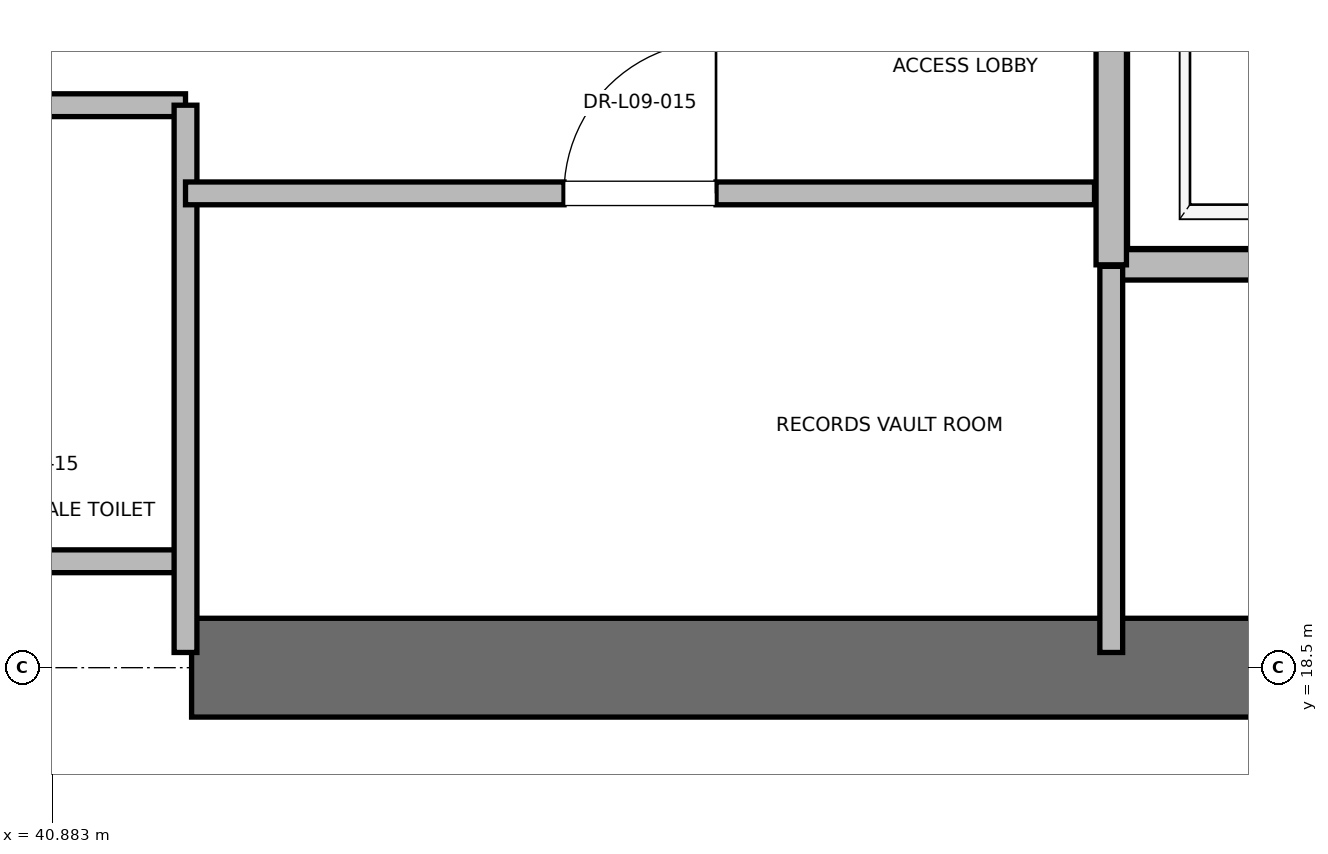
"""IFC4 building model, lengths in metres.
Left out: names, types, materials, properties, quantities, classifications, styles, units other than length and angle.
Written with IfcOpenShell. Run it as: python <this file> out.ifc"""

import sys

from ifc_helpers import new_model, si_unit, direction, frame, frame_2d, origin, place, context, subcontext, project, spatial, rectangle, extrude, element, fill, save


model = new_model("IFC4")
c1 = context("Model", 3, precision=1e-05, world=origin(), true_north=direction((0.0, 1.0)))
c2 = subcontext(c1, "Body", "Model", "MODEL_VIEW")
j1 = project(units=[si_unit("LENGTHUNIT", "METRE"), si_unit("PLANEANGLEUNIT", "RADIAN")], contexts=[c1])
p1 = place(None, origin())
s1 = spatial("IfcSite", under=j1, at=p1, CompositionType="ELEMENT")
p2 = place(p1, origin())
s2 = spatial("IfcBuilding", under=s1, at=p2, CompositionType="ELEMENT")
p3 = place(p2, frame((0.0, 0.0, 43.6)))
s3 = spatial("IfcBuildingStorey", under=s2, at=p3, CompositionType="ELEMENT", Elevation=43.6)
p4 = place(p3, frame((41.8, 18.5, 0.0), z_axis=(0.0, 0.0, 1.0), x_axis=(1.0, 0.0, 0.0)))
e1 = element("IfcWall", 1, at=p4, inside=s3, PredefinedType="SHEAR", context=c2, shape_type="SweptSolid", body=[
    extrude(rectangle(XDim=9.2, YDim=0.65, at=frame_2d((4.6, 0.0))), origin(), (0.0, 0.0, 1.0), 3.76),
])
p5 = place(p3, frame((47.85, 21.15, 0.0), z_axis=(0.0, 0.0, 1.0), x_axis=(1.0, 0.0, 0.0)))
e2 = element("IfcWall", 2, at=p5, inside=s3, PredefinedType="SOLIDWALL", context=c2, shape_type="SweptSolid", body=[
    extrude(rectangle(XDim=2.6, YDim=0.2, at=frame_2d((1.3, 0.0))), origin(), (0.0, 0.0, 1.0), 3.76),
])
p6 = place(p3, frame((47.85, 24.15, 0.0), z_axis=(0.0, 0.0, 1.0), x_axis=(0.0, -1.0, 0.0)))
e3 = element("IfcWall", 3, at=p6, inside=s3, PredefinedType="SOLIDWALL", context=c2, shape_type="SweptSolid", body=[
    extrude(rectangle(XDim=3.0, YDim=0.2, at=frame_2d((1.5, 0.0))), origin(), (0.0, 0.0, 1.0), 3.76),
])
for number, where, z_axis, x_axis in (
    (4, (39.95, 19.2, 0.0), (0.0, 0.0, 1.0), (1.0, 0.0, 0.0)),
    (5, (39.95, 22.2, 0.0), (0.0, 0.0, 1.0), (1.0, 0.0, 0.0)),
):
    element("IfcWall", number, at=place(p3, frame(where, z_axis=z_axis, x_axis=x_axis)), inside=s3, PredefinedType="PARTITIONING", context=c2, shape_type="SweptSolid", body=[
        extrude(rectangle(XDim=1.81, YDim=0.15, at=frame_2d((0.905, 0.0))), origin(), (0.0, 0.0, 1.0), 2.85),
    ])
p7 = place(p3, frame((41.76, 18.6, 0.0), z_axis=(0.0, 0.0, 1.0), x_axis=(0.0, 1.0, 0.0)))
e6 = element("IfcWall", 6, at=p7, inside=s3, PredefinedType="PARTITIONING", context=c2, shape_type="SweptSolid", body=[
    extrude(rectangle(XDim=3.6, YDim=0.15, at=frame_2d((1.8, 0.0))), origin(), (0.0, 0.0, 1.0), 2.54),
])
p8 = place(p3, frame((47.85, 18.6, 0.0), z_axis=(0.0, 0.0, 1.0), x_axis=(0.0, 1.0, 0.0)))
e7 = element("IfcWall", 7, at=p8, inside=s3, PredefinedType="PARTITIONING", context=c2, shape_type="SweptSolid", body=[
    extrude(rectangle(XDim=2.54, YDim=0.15, at=frame_2d((1.27, 0.0))), origin(), (0.0, 0.0, 1.0), 2.85),
])
p9 = place(p3, frame((41.76, 21.62, 0.0), z_axis=(0.0, 0.0, 1.0), x_axis=(1.0, 0.0, 0.0)))
e8 = element("IfcWall", 8, at=p9, inside=s3, PredefinedType="PARTITIONING", context=c2, shape_type="SweptSolid", body=[
    extrude(rectangle(XDim=5.98, YDim=0.15, at=frame_2d((2.99, 0.0))), origin(), (0.0, 0.0, 1.0), 2.85),
])
p10 = place(p9, frame((2.49, 0.0, 0.0)))
e9 = element("IfcOpeningElement", 9, at=p10, cuts=e8, PredefinedType="OPENING", context=c2, shape_type="SweptSolid", body=[
    extrude(rectangle(XDim=1.0, YDim=2.15, at=frame_2d((0.5, 1.075))), frame((0.0, 0.075, 0.0), z_axis=(0.0, -1.0, 0.0), x_axis=(1.0, 0.0, 0.0)), (0.0, 0.0, 1.0), 0.15),
])
p11 = place(p10, origin())
e10 = element("IfcDoor", 10, at=p11, inside=s3, OperationType="SINGLE_SWING_RIGHT", PredefinedType="DOOR", context=c2, shape_type="SweptSolid", body=[
    extrude(rectangle(XDim=1.0, YDim=2.15, at=frame_2d((0.5, 1.075))), frame((0.0, 0.025, 0.0), z_axis=(0.0, -1.0, 0.0), x_axis=(1.0, 0.0, 0.0)), (0.0, 0.0, 1.0), 0.05),
])
fill(e9, e10)
save(model, sys.argv[1])
